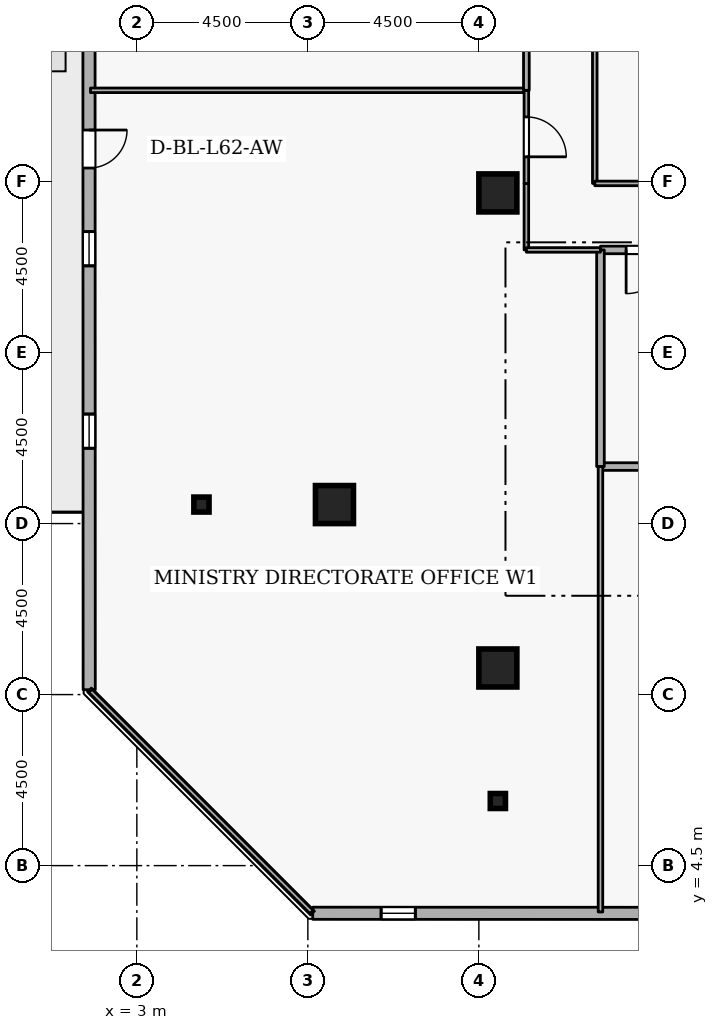
"""IFC4 building model, lengths in metres.
Left out: names, types, materials, properties, quantities, classifications, styles, units other than length and angle.
Written with IfcOpenShell. Run it as: python <this file> out.ifc"""

import sys

from ifc_helpers import new_model, si_unit, direction, frame, frame_2d, origin, origin_2d, place, context, subcontext, project, spatial, rectangle, i_section, extrude, element, fill, save


model = new_model("IFC4")
c1 = context("Model", 3, precision=1e-05, world=origin(), true_north=direction((0.0, 1.0)))
c2 = subcontext(c1, "Body", "Model", "MODEL_VIEW")
j1 = project(units=[si_unit("LENGTHUNIT", "METRE"), si_unit("PLANEANGLEUNIT", "RADIAN")], contexts=[c1])
p1 = place(None, origin())
s1 = spatial("IfcSite", under=j1, at=p1, CompositionType="ELEMENT")
p2 = place(p1, origin())
s2 = spatial("IfcBuilding", under=s1, at=p2, CompositionType="ELEMENT")
p3 = place(p2, frame((0.0, 0.0, 233.1)))
s3 = spatial("IfcBuildingStorey", under=s2, at=p3, CompositionType="ELEMENT", Elevation=233.1)
for number, where, z_axis, x_axis in (
    (1, (12.5, 9.7, 0.0), (0.0, 0.0, 1.0), (1.0, 0.0, 0.0)),
    (2, (8.2, 14.0, 0.0), (0.0, 0.0, 1.0), (1.0, 0.0, 0.0)),
    (3, (12.5, 22.2, 0.0), (0.0, 0.0, 1.0), (1.0, 0.0, 0.0)),
):
    element("IfcColumn", number, at=place(p3, frame(where, z_axis=z_axis, x_axis=x_axis)), inside=s3, PredefinedType="COLUMN", context=c2, shape_type="SweptSolid", body=[
        extrude(rectangle(XDim=1.0, YDim=1.0, at=origin_2d()), origin(), (0.0, 0.0, 1.0), 3.6),
    ])
for number, where, z_axis, x_axis in (
    (4, (12.5, 6.2, 0.0), (0.0, 0.0, 1.0), (1.0, 0.0, 0.0)),
    (5, (4.7, 14.0, 0.0), (0.0, 0.0, 1.0), (1.0, 0.0, 0.0)),
):
    element("IfcColumn", number, at=place(p3, frame(where, z_axis=z_axis, x_axis=x_axis)), inside=s3, PredefinedType="COLUMN", context=c2, shape_type="SweptSolid", body=[
        extrude(i_section(OverallWidth=0.399, OverallDepth=0.394, WebThickness=0.023, FlangeThickness=0.037, FilletRadius=0.015, at=origin_2d()), origin(), (0.0, 0.0, 1.0), 3.6),
    ])
p4 = place(p3, frame((7.628, 3.246, 0.0), z_axis=(0.0, 0.0, 1.0), x_axis=(0.999999944762, -0.000332378036, 0.0)))
e6 = element("IfcWall", 6, at=p4, inside=s3, PredefinedType="STANDARD", context=c2, shape_type="SweptSolid", body=[
    extrude(rectangle(XDim=33.054, YDim=0.32, at=frame_2d((16.527, 0.0))), origin(), (0.0, 0.0, 1.0), 2.7),
])
p5 = place(p4, frame((1.8, 0.0, 0.72)))
e7 = element("IfcOpeningElement", 7, at=p5, cuts=e6, PredefinedType="OPENING", context=c2, shape_type="SweptSolid", body=[
    extrude(rectangle(XDim=0.9, YDim=1.75, at=frame_2d((0.45, 0.875))), frame((0.0, 0.17, 0.0), z_axis=(0.0, -1.0, 0.0), x_axis=(1.0, 0.0, 0.0)), (0.0, 0.0, 1.0), 0.34),
])
p6 = place(p4, frame((11.4, 0.0, 0.72)))
e8 = element("IfcOpeningElement", 8, at=p6, cuts=e6, PredefinedType="OPENING", context=c2, shape_type="SweptSolid", body=[
    extrude(rectangle(XDim=0.9, YDim=1.75, at=frame_2d((0.45, 0.875))), frame((0.0, 0.17, 0.0), z_axis=(0.0, -1.0, 0.0), x_axis=(1.0, 0.0, 0.0)), (0.0, 0.0, 1.0), 0.34),
])
p7 = place(p4, frame((16.2, 0.0, 0.72)))
e9 = element("IfcOpeningElement", 9, at=p7, cuts=e6, PredefinedType="OPENING", context=c2, shape_type="SweptSolid", body=[
    extrude(rectangle(XDim=0.9, YDim=1.75, at=frame_2d((0.45, 0.875))), frame((0.0, 0.17, 0.0), z_axis=(0.0, -1.0, 0.0), x_axis=(1.0, 0.0, 0.0)), (0.0, 0.0, 1.0), 0.34),
])
p8 = place(p4, frame((21.0, 0.0, 0.72)))
e10 = element("IfcOpeningElement", 10, at=p8, cuts=e6, PredefinedType="OPENING", context=c2, shape_type="SweptSolid", body=[
    extrude(rectangle(XDim=0.9, YDim=1.75, at=frame_2d((0.45, 0.875))), frame((0.0, 0.17, 0.0), z_axis=(0.0, -1.0, 0.0), x_axis=(1.0, 0.0, 0.0)), (0.0, 0.0, 1.0), 0.34),
])
p9 = place(p3, frame((1.735, 42.181, 0.0), z_axis=(0.0, 0.0, 1.0), x_axis=(0.000332378036, -0.999999944762, 0.0)))
e11 = element("IfcWall", 11, at=p9, inside=s3, PredefinedType="STANDARD", context=c2, shape_type="SweptSolid", body=[
    extrude(rectangle(XDim=33.054, YDim=0.32, at=frame_2d((16.527, 0.0))), origin(), (0.0, 0.0, 1.0), 2.7),
])
p10 = place(p9, frame((18.327, 0.0, 0.0)))
e12 = element("IfcOpeningElement", 12, at=p10, cuts=e11, PredefinedType="OPENING", context=c2, shape_type="SweptSolid", body=[
    extrude(rectangle(XDim=1.0, YDim=2.08, at=frame_2d((0.5, 1.04))), frame((0.0, 0.17, 0.0), z_axis=(0.0, -1.0, 0.0), x_axis=(1.0, 0.0, 0.0)), (0.0, 0.0, 1.0), 0.34),
])
p11 = place(p9, frame((1.8, 0.0, 0.72)))
e13 = element("IfcOpeningElement", 13, at=p11, cuts=e11, PredefinedType="OPENING", context=c2, shape_type="SweptSolid", body=[
    extrude(rectangle(XDim=0.9, YDim=1.75, at=frame_2d((0.45, 0.875))), frame((0.0, 0.17, 0.0), z_axis=(0.0, -1.0, 0.0), x_axis=(1.0, 0.0, 0.0)), (0.0, 0.0, 1.0), 0.34),
])
p12 = place(p9, frame((6.6, 0.0, 0.72)))
e14 = element("IfcOpeningElement", 14, at=p12, cuts=e11, PredefinedType="OPENING", context=c2, shape_type="SweptSolid", body=[
    extrude(rectangle(XDim=0.9, YDim=1.75, at=frame_2d((0.45, 0.875))), frame((0.0, 0.17, 0.0), z_axis=(0.0, -1.0, 0.0), x_axis=(1.0, 0.0, 0.0)), (0.0, 0.0, 1.0), 0.34),
])
p13 = place(p9, frame((11.4, 0.0, 0.72)))
e15 = element("IfcOpeningElement", 15, at=p13, cuts=e11, PredefinedType="OPENING", context=c2, shape_type="SweptSolid", body=[
    extrude(rectangle(XDim=0.9, YDim=1.75, at=frame_2d((0.45, 0.875))), frame((0.0, 0.17, 0.0), z_axis=(0.0, -1.0, 0.0), x_axis=(1.0, 0.0, 0.0)), (0.0, 0.0, 1.0), 0.34),
])
p14 = place(p9, frame((21.0, 0.0, 0.72)))
e16 = element("IfcOpeningElement", 16, at=p14, cuts=e11, PredefinedType="OPENING", context=c2, shape_type="SweptSolid", body=[
    extrude(rectangle(XDim=0.9, YDim=1.75, at=frame_2d((0.45, 0.875))), frame((0.0, 0.17, 0.0), z_axis=(0.0, -1.0, 0.0), x_axis=(1.0, 0.0, 0.0)), (0.0, 0.0, 1.0), 0.34),
])
p15 = place(p9, frame((25.8, 0.0, 0.72)))
e17 = element("IfcOpeningElement", 17, at=p15, cuts=e11, PredefinedType="OPENING", context=c2, shape_type="SweptSolid", body=[
    extrude(rectangle(XDim=0.9, YDim=1.75, at=frame_2d((0.45, 0.875))), frame((0.0, 0.17, 0.0), z_axis=(0.0, -1.0, 0.0), x_axis=(1.0, 0.0, 0.0)), (0.0, 0.0, 1.0), 0.34),
])
p16 = place(p3, frame((15.2, 15.0, 0.0), z_axis=(0.0, 0.0, 1.0), x_axis=(1.0, 0.0, 0.0)))
e18 = element("IfcWall", 18, at=p16, inside=s3, PredefinedType="STANDARD", context=c2, shape_type="SweptSolid", body=[
    extrude(rectangle(XDim=2.5, YDim=0.2, at=frame_2d((1.25, 0.0))), origin(), (0.0, 0.0, 1.0), 3.34),
])
p17 = place(p3, frame((17.7, 20.7, 0.0), z_axis=(0.0, 0.0, 1.0), x_axis=(-1.0, 0.0, 0.0)))
e19 = element("IfcWall", 19, at=p17, inside=s3, PredefinedType="STANDARD", context=c2, shape_type="SweptSolid", body=[
    extrude(rectangle(XDim=2.5, YDim=0.2, at=frame_2d((1.25, 0.0))), origin(), (0.0, 0.0, 1.0), 3.34),
])
p18 = place(p17, frame((0.675, 0.0, 0.0)))
e20 = element("IfcOpeningElement", 20, at=p18, cuts=e19, PredefinedType="OPENING", context=c2, shape_type="SweptSolid", body=[
    extrude(rectangle(XDim=1.15, YDim=2.1, at=frame_2d((0.575, 1.05))), frame((0.0, 0.11, 0.0), z_axis=(0.0, -1.0, 0.0), x_axis=(1.0, 0.0, 0.0)), (0.0, 0.0, 1.0), 0.22),
])
p19 = place(p3, frame((15.2, 20.7, 0.0), z_axis=(0.0, 0.0, 1.0), x_axis=(0.0, -1.0, 0.0)))
e21 = element("IfcWall", 21, at=p19, inside=s3, PredefinedType="STANDARD", context=c2, shape_type="SweptSolid", body=[
    extrude(rectangle(XDim=5.7, YDim=0.2, at=frame_2d((2.85, 0.0))), origin(), (0.0, 0.0, 1.0), 3.34),
])
p20 = place(p3, frame((13.25, 22.45, 0.0), z_axis=(0.0, 0.0, 1.0), x_axis=(0.0, -1.0, 0.0)))
e22 = element("IfcWall", 22, at=p20, inside=s3, PredefinedType="PARTITIONING", context=c2, shape_type="SweptSolid", body=[
    extrude(rectangle(XDim=1.75, YDim=0.12, at=frame_2d((0.875, 0.0))), origin(), (0.0, 0.0, 1.0), 3.34),
])
p21 = place(p3, frame((13.25, 20.7, 0.0), z_axis=(0.0, 0.0, 1.0), x_axis=(1.0, 0.0, 0.0)))
e23 = element("IfcWall", 23, at=p21, inside=s3, PredefinedType="PARTITIONING", context=c2, shape_type="SweptSolid", body=[
    extrude(rectangle(XDim=1.95, YDim=0.12, at=frame_2d((0.975, 0.0))), origin(), (0.0, 0.0, 1.0), 3.34),
])
p22 = place(p3, frame((15.2, 15.0, 0.0), z_axis=(0.0, 0.0, 1.0), x_axis=(0.0, -1.0, 0.0)))
e24 = element("IfcWall", 24, at=p22, inside=s3, PredefinedType="PARTITIONING", context=c2, shape_type="SweptSolid", body=[
    extrude(rectangle(XDim=11.72, YDim=0.12, at=frame_2d((5.86, 0.0))), origin(), (0.0, 0.0, 1.0), 3.34),
])
p23 = place(p3, frame((7.598, 3.28, 0.0), z_axis=(0.0, 0.0, 1.0), x_axis=(-0.707106781187, 0.707106781187, 0.0)))
e25 = element("IfcWall", 25, at=p23, inside=s3, PredefinedType="PARTITIONING", context=c2, shape_type="SweptSolid", body=[
    extrude(rectangle(XDim=8.227, YDim=0.12, at=frame_2d((4.114, 0.0))), origin(), (0.0, 0.0, 1.0), 3.34),
])
p24 = place(p3, frame((1.78, 24.9, 0.0), z_axis=(0.0, 0.0, 1.0), x_axis=(1.0, 0.0, 0.0)))
e26 = element("IfcWall", 26, at=p24, inside=s3, PredefinedType="PARTITIONING", context=c2, shape_type="SweptSolid", body=[
    extrude(rectangle(XDim=11.47, YDim=0.12, at=frame_2d((5.735, 0.0))), origin(), (0.0, 0.0, 1.0), 3.34),
])
p25 = place(p3, frame((13.25, 24.9, 0.0), z_axis=(0.0, 0.0, 1.0), x_axis=(0.0, -1.0, 0.0)))
e27 = element("IfcWall", 27, at=p25, inside=s3, PredefinedType="PARTITIONING", context=c2, shape_type="SweptSolid", body=[
    extrude(rectangle(XDim=2.45, YDim=0.12, at=frame_2d((1.225, 0.0))), origin(), (0.0, 0.0, 1.0), 3.34),
])
p26 = place(p25, frame((0.7, 0.0, 0.0)))
e28 = element("IfcOpeningElement", 28, at=p26, cuts=e27, PredefinedType="OPENING", context=c2, shape_type="SweptSolid", body=[
    extrude(rectangle(XDim=1.05, YDim=2.1, at=frame_2d((0.525, 1.05))), frame((0.0, 0.07, 0.0), z_axis=(0.0, -1.0, 0.0), x_axis=(1.0, 0.0, 0.0)), (0.0, 0.0, 1.0), 0.14),
])
p27 = place(p3, frame((13.25, 29.1, 0.0), z_axis=(0.0, 0.0, 1.0), x_axis=(0.0, -1.0, 0.0)))
e29 = element("IfcWall", 29, at=p27, inside=s3, PredefinedType="PARTITIONING", context=c2, shape_type="SweptSolid", body=[
    extrude(rectangle(XDim=4.2, YDim=0.15, at=frame_2d((2.1, 0.0))), origin(), (0.0, 0.0, 1.0), 3.34),
])
p28 = place(p27, frame((1.45, 0.0, 0.0)))
e30 = element("IfcOpeningElement", 30, at=p28, cuts=e29, PredefinedType="OPENING", context=c2, shape_type="SweptSolid", body=[
    extrude(rectangle(XDim=1.3, YDim=2.12, at=frame_2d((0.65, 1.06))), frame((0.0, 0.085, 0.0), z_axis=(0.0, -1.0, 0.0), x_axis=(1.0, 0.0, 0.0)), (0.0, 0.0, 1.0), 0.17),
])
p29 = place(p3, frame((15.05, 22.45, 0.0), z_axis=(0.0, 0.0, 1.0), x_axis=(0.0, 1.0, 0.0)))
e31 = element("IfcWall", 31, at=p29, inside=s3, PredefinedType="PARTITIONING", context=c2, shape_type="SweptSolid", body=[
    extrude(rectangle(XDim=9.1, YDim=0.12, at=frame_2d((4.55, 0.0))), origin(), (0.0, 0.0, 1.0), 3.34),
])
p30 = place(p29, frame((4.075, 0.0, 0.0)))
e32 = element("IfcOpeningElement", 32, at=p30, cuts=e31, PredefinedType="OPENING", context=c2, shape_type="SweptSolid", body=[
    extrude(rectangle(XDim=0.95, YDim=2.1, at=frame_2d((0.475, 1.05))), frame((0.0, 0.07, 0.0), z_axis=(0.0, -1.0, 0.0), x_axis=(1.0, 0.0, 0.0)), (0.0, 0.0, 1.0), 0.14),
])
p31 = place(p3, frame((20.9, 22.45, 0.0), z_axis=(0.0, 0.0, 1.0), x_axis=(-1.0, 0.0, 0.0)))
e33 = element("IfcWall", 33, at=p31, inside=s3, PredefinedType="PARTITIONING", context=c2, shape_type="SweptSolid", body=[
    extrude(rectangle(XDim=5.85, YDim=0.12, at=frame_2d((2.925, 0.0))), origin(), (0.0, 0.0, 1.0), 3.34),
])
p32 = place(p5, origin())
e34 = element("IfcWindow", 34, at=p32, inside=s3, PartitioningType="SINGLE_PANEL", PredefinedType="WINDOW", context=c2, shape_type="SweptSolid", body=[
    extrude(rectangle(XDim=0.9, YDim=1.75, at=frame_2d((0.45, 0.875))), frame((0.0, 0.03, 0.0), z_axis=(0.0, -1.0, 0.0), x_axis=(1.0, 0.0, 0.0)), (0.0, 0.0, 1.0), 0.06),
])
fill(e7, e34)
p33 = place(p10, origin())
e35 = element("IfcDoor", 35, at=p33, inside=s3, OperationType="SINGLE_SWING_LEFT", PredefinedType="DOOR", context=c2, shape_type="SweptSolid", body=[
    extrude(rectangle(XDim=1.0, YDim=2.08, at=frame_2d((0.5, 1.04))), frame((0.0, 0.025, 0.0), z_axis=(0.0, -1.0, 0.0), x_axis=(1.0, 0.0, 0.0)), (0.0, 0.0, 1.0), 0.05),
])
fill(e12, e35)
p34 = place(p14, origin())
e36 = element("IfcWindow", 36, at=p34, inside=s3, PartitioningType="SINGLE_PANEL", PredefinedType="WINDOW", context=c2, shape_type="SweptSolid", body=[
    extrude(rectangle(XDim=0.9, YDim=1.75, at=frame_2d((0.45, 0.875))), frame((0.0, 0.03, 0.0), z_axis=(0.0, -1.0, 0.0), x_axis=(1.0, 0.0, 0.0)), (0.0, 0.0, 1.0), 0.06),
])
fill(e16, e36)
p35 = place(p15, origin())
e37 = element("IfcWindow", 37, at=p35, inside=s3, PartitioningType="SINGLE_PANEL", PredefinedType="WINDOW", context=c2, shape_type="SweptSolid", body=[
    extrude(rectangle(XDim=0.9, YDim=1.75, at=frame_2d((0.45, 0.875))), frame((0.0, 0.03, 0.0), z_axis=(0.0, -1.0, 0.0), x_axis=(1.0, 0.0, 0.0)), (0.0, 0.0, 1.0), 0.06),
])
fill(e17, e37)
p36 = place(p18, origin())
e38 = element("IfcDoor", 38, at=p36, inside=s3, OperationType="SINGLE_SWING_RIGHT", PredefinedType="DOOR", context=c2, shape_type="SweptSolid", body=[
    extrude(rectangle(XDim=1.15, YDim=2.1, at=frame_2d((0.575, 1.05))), frame((0.0, 0.025, 0.0), z_axis=(0.0, -1.0, 0.0), x_axis=(1.0, 0.0, 0.0)), (0.0, 0.0, 1.0), 0.05),
])
fill(e20, e38)
p37 = place(p26, origin())
e39 = element("IfcDoor", 39, at=p37, inside=s3, OperationType="SINGLE_SWING_RIGHT", PredefinedType="DOOR", context=c2, shape_type="SweptSolid", body=[
    extrude(rectangle(XDim=1.05, YDim=2.1, at=frame_2d((0.525, 1.05))), frame((0.0, 0.025, 0.0), z_axis=(0.0, -1.0, 0.0), x_axis=(1.0, 0.0, 0.0)), (0.0, 0.0, 1.0), 0.05),
])
fill(e28, e39)
save(model, sys.argv[1])
